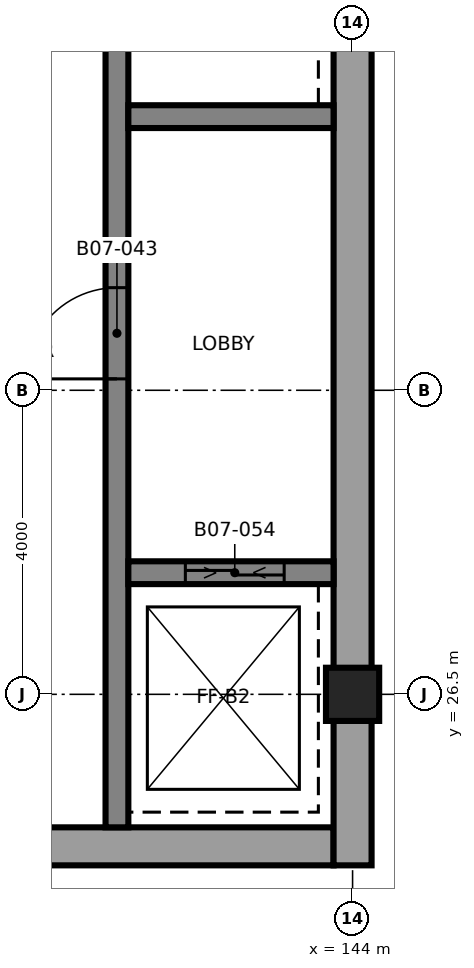
"""IFC4 building model, lengths in metres.
Left out: names, types, materials, properties, quantities, classifications, styles, units other than length and angle.
Written with IfcOpenShell. Run it as: python <this file> out.ifc"""

import sys

from ifc_helpers import new_model, si_unit, direction, frame, frame_2d, origin, origin_2d, place, context, subcontext, project, spatial, rectangle, extrude, element, fill, save


model = new_model("IFC4")
c1 = context("Model", 3, precision=1e-05, world=origin(), true_north=direction((0.0, 1.0)))
c2 = subcontext(c1, "Body", "Model", "MODEL_VIEW")
j1 = project(units=[si_unit("LENGTHUNIT", "METRE"), si_unit("PLANEANGLEUNIT", "RADIAN")], contexts=[c1])
p1 = place(None, origin())
s1 = spatial("IfcSite", under=j1, at=p1, CompositionType="ELEMENT")
p2 = place(p1, origin())
s2 = spatial("IfcBuilding", under=s1, at=p2, CompositionType="ELEMENT")
p3 = place(p2, frame((0.0, 0.0, 90.8)))
s3 = spatial("IfcBuildingStorey", under=s2, at=p3, CompositionType="ELEMENT", Elevation=90.8)
p4 = place(p3, frame((128.75, 24.5, 0.0), z_axis=(0.0, 0.0, 1.0), x_axis=(1.0, 0.0, 0.0)))
e1 = element("IfcWall", 1, at=p4, inside=s3, PredefinedType="SHEAR", context=c2, shape_type="SweptSolid", body=[
    extrude(rectangle(XDim=15.0, YDim=0.5, at=frame_2d((7.5, 0.0))), origin(), (0.0, 0.0, 1.0), 3.7),
])
p5 = place(p4, frame((9.65, 0.0, 0.0)))
e2 = element("IfcOpeningElement", 2, at=p5, cuts=e1, PredefinedType="OPENING", context=c2, shape_type="SweptSolid", body=[
    extrude(rectangle(XDim=1.5, YDim=2.1, at=frame_2d((0.75, 1.05))), frame((0.0, 0.26, 0.0), z_axis=(0.0, -1.0, 0.0), x_axis=(1.0, 0.0, 0.0)), (0.0, 0.0, 1.0), 0.52),
])
p6 = place(p4, frame((1.25, 0.0, 0.0)))
e3 = element("IfcOpeningElement", 3, at=p6, cuts=e1, PredefinedType="OPENING", context=c2, shape_type="SweptSolid", body=[
    extrude(rectangle(XDim=0.9, YDim=2.1, at=frame_2d((0.45, 1.05))), frame((0.0, 0.26, 0.0), z_axis=(0.0, -1.0, 0.0), x_axis=(1.0, 0.0, 0.0)), (0.0, 0.0, 1.0), 0.52),
])
p7 = place(p3, frame((144.0, 24.25, 0.0), z_axis=(0.0, 0.0, 1.0), x_axis=(0.0, 1.0, 0.0)))
e4 = element("IfcWall", 4, at=p7, inside=s3, PredefinedType="SHEAR", context=c2, shape_type="SweptSolid", body=[
    extrude(rectangle(XDim=13.5, YDim=0.5, at=frame_2d((6.75, 0.0))), origin(), (0.0, 0.0, 1.0), 3.7),
])
p8 = place(p3, frame((140.9, 24.75, 0.0), z_axis=(0.0, 0.0, 1.0), x_axis=(0.0, 1.0, 0.0)))
e5 = element("IfcWall", 5, at=p8, inside=s3, PredefinedType="SHEAR", context=c2, shape_type="SweptSolid", body=[
    extrude(rectangle(XDim=12.5, YDim=0.3, at=frame_2d((6.25, 0.0))), origin(), (0.0, 0.0, 1.0), 3.7),
])
p9 = place(p8, frame((5.9, 0.0, 0.0)))
e6 = element("IfcOpeningElement", 6, at=p9, cuts=e5, PredefinedType="OPENING", context=c2, shape_type="SweptSolid", body=[
    extrude(rectangle(XDim=1.2, YDim=2.1, at=frame_2d((0.6, 1.05))), frame((0.0, 0.16, 0.0), z_axis=(0.0, -1.0, 0.0), x_axis=(1.0, 0.0, 0.0)), (0.0, 0.0, 1.0), 0.32),
])
p10 = place(p3, frame((141.05, 28.1, 0.0), z_axis=(0.0, 0.0, 1.0), x_axis=(1.0, 0.0, 0.0)))
e7 = element("IfcWall", 7, at=p10, inside=s3, PredefinedType="SHEAR", context=c2, shape_type="SweptSolid", body=[
    extrude(rectangle(XDim=2.7, YDim=0.3, at=frame_2d((1.35, 0.0))), origin(), (0.0, 0.0, 1.0), 3.7),
])
p11 = place(p10, frame((0.75, 0.0, 0.0)))
e8 = element("IfcOpeningElement", 8, at=p11, cuts=e7, PredefinedType="OPENING", context=c2, shape_type="SweptSolid", body=[
    extrude(rectangle(XDim=1.3, YDim=2.4, at=frame_2d((0.65, 1.2))), frame((0.0, 0.16, 0.0), z_axis=(0.0, -1.0, 0.0), x_axis=(1.0, 0.0, 0.0)), (0.0, 0.0, 1.0), 0.32),
])
p12 = place(p3, frame((141.05, 34.1, 0.0), z_axis=(0.0, 0.0, 1.0), x_axis=(1.0, 0.0, 0.0)))
e9 = element("IfcWall", 9, at=p12, inside=s3, PredefinedType="SHEAR", context=c2, shape_type="SweptSolid", body=[
    extrude(rectangle(XDim=2.7, YDim=0.3, at=frame_2d((1.35, 0.0))), origin(), (0.0, 0.0, 1.0), 3.7),
])
p13 = place(p3, frame((144.0, 26.5, 0.0), z_axis=(0.0, 0.0, 1.0), x_axis=(1.0, 0.0, 0.0)))
e10 = element("IfcColumn", 10, at=p13, inside=s3, PredefinedType="COLUMN", context=c2, shape_type="SweptSolid", body=[
    extrude(rectangle(XDim=0.7, YDim=0.7, at=origin_2d()), origin(), (0.0, 0.0, 1.0), 3.7),
])
p14 = place(p9, origin())
e11 = element("IfcDoor", 11, at=p14, inside=s3, OperationType="SINGLE_SWING_RIGHT", PredefinedType="DOOR", context=c2, shape_type="SweptSolid", body=[
    extrude(rectangle(XDim=1.2, YDim=2.1, at=frame_2d((0.6, 1.05))), frame((0.0, 0.025, 0.0), z_axis=(0.0, -1.0, 0.0), x_axis=(1.0, 0.0, 0.0)), (0.0, 0.0, 1.0), 0.05),
])
fill(e6, e11)
p15 = place(p11, origin())
e12 = element("IfcDoor", 12, at=p15, inside=s3, OperationType="SLIDING_TO_LEFT", PredefinedType="DOOR", context=c2, shape_type="SweptSolid", body=[
    extrude(rectangle(XDim=1.3, YDim=2.4, at=frame_2d((0.65, 1.2))), frame((0.0, 0.025, 0.0), z_axis=(0.0, -1.0, 0.0), x_axis=(1.0, 0.0, 0.0)), (0.0, 0.0, 1.0), 0.05),
])
fill(e8, e12)
save(model, sys.argv[1])
